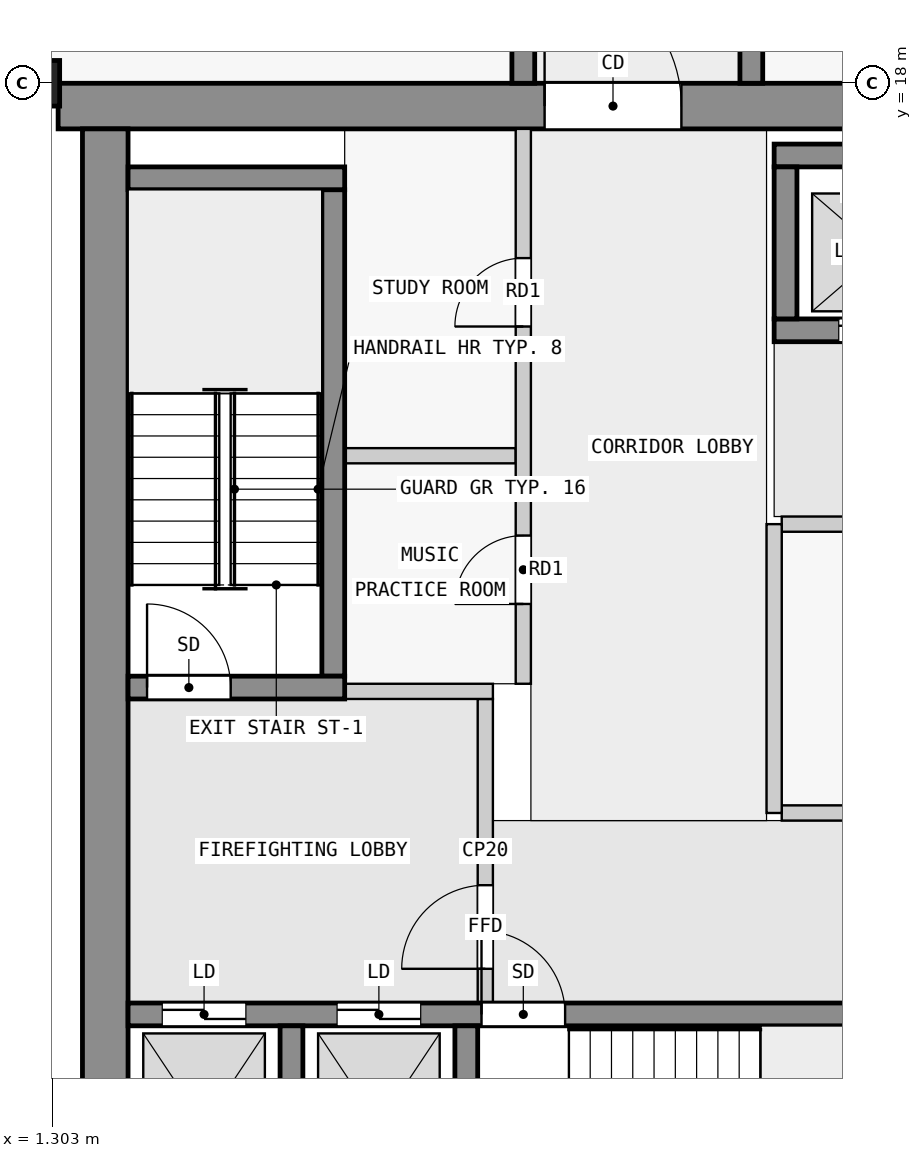
"""IFC4 building model, lengths in metres.
Left out: names, types, materials, properties, quantities, classifications, styles, units other than length and angle.
Written with IfcOpenShell. Run it as: python <this file> out.ifc"""

import sys

from ifc_helpers import new_model, si_unit, direction, frame, frame_2d, origin, origin_2d, place, context, subcontext, project, spatial, rectangle, extrude, element, fill, save


model = new_model("IFC4")
c1 = context("Model", 3, precision=1e-05, world=origin(), true_north=direction((0.0, 1.0)))
c2 = subcontext(c1, "Body", "Model", "MODEL_VIEW")
j1 = project(units=[si_unit("LENGTHUNIT", "METRE"), si_unit("PLANEANGLEUNIT", "RADIAN")], contexts=[c1])
p1 = place(None, origin())
s1 = spatial("IfcSite", under=j1, at=p1, CompositionType="ELEMENT")
p2 = place(p1, origin())
s2 = spatial("IfcBuilding", under=s1, at=p2, CompositionType="ELEMENT")
p3 = place(p2, frame((0.0, 0.0, 160.4)))
s3 = spatial("IfcBuildingStorey", under=s2, at=p3, CompositionType="ELEMENT", Elevation=160.4)
p4 = place(p3, frame((0.7, 18.0, 0.0), z_axis=(0.0, 0.0, 1.0), x_axis=(0.0, 1.0, 0.0)))
e1 = element("IfcColumn", 1, at=p4, inside=s3, PredefinedType="COLUMN", context=c2, shape_type="SweptSolid", body=[
    extrude(rectangle(XDim=0.6, YDim=1.4, at=origin_2d()), origin(), (0.0, 0.0, 1.0), 3.5),
])
p5 = place(p3, frame((1.38, 17.7, 0.0), z_axis=(0.0, 0.0, 1.0), x_axis=(1.0, 0.0, 0.0)))
e2 = element("IfcWall", 2, at=p5, inside=s3, PredefinedType="SHEAR", context=c2, shape_type="SweptSolid", body=[
    extrude(rectangle(XDim=21.12, YDim=0.6, at=frame_2d((10.56, 0.0))), origin(), (0.0, 0.0, 1.0), 3.25),
])
p6 = place(p5, frame((6.4, 0.0, 0.0)))
e3 = element("IfcOpeningElement", 3, at=p6, cuts=e2, PredefinedType="OPENING", context=c2, shape_type="SweptSolid", body=[
    extrude(rectangle(XDim=1.8, YDim=2.1, at=frame_2d((0.9, 1.05))), frame((0.0, 0.31, 0.0), z_axis=(0.0, -1.0, 0.0), x_axis=(1.0, 0.0, 0.0)), (0.0, 0.0, 1.0), 0.62),
])
p7 = place(p3, frame((2.0, 2.5, 0.0), z_axis=(0.0, 0.0, 1.0), x_axis=(0.0, 1.0, 0.0)))
e4 = element("IfcWall", 4, at=p7, inside=s3, PredefinedType="SHEAR", context=c2, shape_type="SweptSolid", body=[
    extrude(rectangle(XDim=14.9, YDim=0.6, at=frame_2d((7.45, 0.0))), origin(), (0.0, 0.0, 1.0), 3.25),
])
for number, where, z_axis, x_axis in (
    (5, (4.45, 2.8, 0.0), (0.0, 0.0, 1.0), (0.0, 1.0, 0.0)),
    (6, (6.75, 2.8, 0.0), (0.0, 0.0, 1.0), (0.0, 1.0, 0.0)),
):
    element("IfcWall", number, at=place(p3, frame(where, z_axis=z_axis, x_axis=x_axis)), inside=s3, PredefinedType="SHEAR", context=c2, shape_type="SweptSolid", body=[
        extrude(rectangle(XDim=2.8, YDim=0.3, at=frame_2d((1.4, 0.0))), origin(), (0.0, 0.0, 1.0), 3.25),
    ])
p8 = place(p3, frame((2.3, 5.75, 0.0), z_axis=(0.0, 0.0, 1.0), x_axis=(1.0, 0.0, 0.0)))
e7 = element("IfcWall", 7, at=p8, inside=s3, PredefinedType="SHEAR", context=c2, shape_type="SweptSolid", body=[
    extrude(rectangle(XDim=18.8, YDim=0.3, at=frame_2d((9.4, 0.0))), origin(), (0.0, 0.0, 1.0), 3.25),
])
p9 = place(p8, frame((4.65, 0.0, 0.0)))
e8 = element("IfcOpeningElement", 8, at=p9, cuts=e7, PredefinedType="OPENING", context=c2, shape_type="SweptSolid", body=[
    extrude(rectangle(XDim=1.1, YDim=2.1, at=frame_2d((0.55, 1.05))), frame((0.0, 0.16, 0.0), z_axis=(0.0, -1.0, 0.0), x_axis=(1.0, 0.0, 0.0)), (0.0, 0.0, 1.0), 0.32),
])
p10 = place(p8, frame((0.45, 0.0, 0.0)))
e9 = element("IfcOpeningElement", 9, at=p10, cuts=e7, PredefinedType="OPENING", context=c2, shape_type="SweptSolid", body=[
    extrude(rectangle(XDim=1.1, YDim=2.1, at=frame_2d((0.55, 1.05))), frame((0.0, 0.16, 0.0), z_axis=(0.0, -1.0, 0.0), x_axis=(1.0, 0.0, 0.0)), (0.0, 0.0, 1.0), 0.32),
])
p11 = place(p8, frame((2.75, 0.0, 0.0)))
e10 = element("IfcOpeningElement", 10, at=p11, cuts=e7, PredefinedType="OPENING", context=c2, shape_type="SweptSolid", body=[
    extrude(rectangle(XDim=1.1, YDim=2.1, at=frame_2d((0.55, 1.05))), frame((0.0, 0.16, 0.0), z_axis=(0.0, -1.0, 0.0), x_axis=(1.0, 0.0, 0.0)), (0.0, 0.0, 1.0), 0.32),
])
p12 = place(p8, frame((11.95, 0.0, 0.0)))
e11 = element("IfcOpeningElement", 11, at=p12, cuts=e7, PredefinedType="OPENING", context=c2, shape_type="SweptSolid", body=[
    extrude(rectangle(XDim=0.9, YDim=2.1, at=frame_2d((0.45, 1.05))), frame((0.0, 0.16, 0.0), z_axis=(0.0, -1.0, 0.0), x_axis=(1.0, 0.0, 0.0)), (0.0, 0.0, 1.0), 0.32),
])
p13 = place(p8, frame((15.7, 0.0, 0.0)))
e12 = element("IfcOpeningElement", 12, at=p13, cuts=e7, PredefinedType="OPENING", context=c2, shape_type="SweptSolid", body=[
    extrude(rectangle(XDim=0.9, YDim=2.1, at=frame_2d((0.45, 1.05))), frame((0.0, 0.16, 0.0), z_axis=(0.0, -1.0, 0.0), x_axis=(1.0, 0.0, 0.0)), (0.0, 0.0, 1.0), 0.32),
])
p14 = place(p3, frame((2.3, 10.05, 0.0), z_axis=(0.0, 0.0, 1.0), x_axis=(1.0, 0.0, 0.0)))
e13 = element("IfcWall", 13, at=p14, inside=s3, PredefinedType="SHEAR", context=c2, shape_type="SweptSolid", body=[
    extrude(rectangle(XDim=2.85, YDim=0.3, at=frame_2d((1.425, 0.0))), origin(), (0.0, 0.0, 1.0), 3.25),
])
p15 = place(p14, frame((0.25, 0.0, 0.0)))
e14 = element("IfcOpeningElement", 14, at=p15, cuts=e13, PredefinedType="OPENING", context=c2, shape_type="SweptSolid", body=[
    extrude(rectangle(XDim=1.1, YDim=2.1, at=frame_2d((0.55, 1.05))), frame((0.0, 0.16, 0.0), z_axis=(0.0, -1.0, 0.0), x_axis=(1.0, 0.0, 0.0)), (0.0, 0.0, 1.0), 0.32),
])
p16 = place(p3, frame((5.0, 10.2, 0.0), z_axis=(0.0, 0.0, 1.0), x_axis=(0.0, 1.0, 0.0)))
e15 = element("IfcWall", 15, at=p16, inside=s3, PredefinedType="SHEAR", context=c2, shape_type="SweptSolid", body=[
    extrude(rectangle(XDim=6.4, YDim=0.3, at=frame_2d((3.2, 0.0))), origin(), (0.0, 0.0, 1.0), 3.25),
])
p17 = place(p3, frame((2.3, 16.75, 0.0), z_axis=(0.0, 0.0, 1.0), x_axis=(1.0, 0.0, 0.0)))
e16 = element("IfcWall", 16, at=p17, inside=s3, PredefinedType="SHEAR", context=c2, shape_type="SweptSolid", body=[
    extrude(rectangle(XDim=2.85, YDim=0.3, at=frame_2d((1.425, 0.0))), origin(), (0.0, 0.0, 1.0), 3.25),
])
p18 = place(p3, frame((10.8, 17.05, 0.0), z_axis=(0.0, 0.0, 1.0), x_axis=(1.0, 0.0, 0.0)))
e17 = element("IfcWall", 17, at=p18, inside=s3, PredefinedType="SHEAR", context=c2, shape_type="SweptSolid", body=[
    extrude(rectangle(XDim=7.8, YDim=0.3, at=frame_2d((3.9, 0.0))), origin(), (0.0, 0.0, 1.0), 3.25),
])
p19 = place(p3, frame((10.8, 14.75, 0.0), z_axis=(0.0, 0.0, 1.0), x_axis=(1.0, 0.0, 0.0)))
e18 = element("IfcWall", 18, at=p19, inside=s3, PredefinedType="SHEAR", context=c2, shape_type="SweptSolid", body=[
    extrude(rectangle(XDim=7.8, YDim=0.3, at=frame_2d((3.9, 0.0))), origin(), (0.0, 0.0, 1.0), 3.25),
])
p20 = place(p19, frame((0.85, 0.0, 0.0)))
e19 = element("IfcOpeningElement", 19, at=p20, cuts=e18, PredefinedType="OPENING", context=c2, shape_type="SweptSolid", body=[
    extrude(rectangle(XDim=1.1, YDim=2.1, at=frame_2d((0.55, 1.05))), frame((0.0, 0.16, 0.0), z_axis=(0.0, -1.0, 0.0), x_axis=(1.0, 0.0, 0.0)), (0.0, 0.0, 1.0), 0.32),
])
p21 = place(p19, frame((3.35, 0.0, 0.0)))
e20 = element("IfcOpeningElement", 20, at=p21, cuts=e18, PredefinedType="OPENING", context=c2, shape_type="SweptSolid", body=[
    extrude(rectangle(XDim=1.1, YDim=2.1, at=frame_2d((0.55, 1.05))), frame((0.0, 0.16, 0.0), z_axis=(0.0, -1.0, 0.0), x_axis=(1.0, 0.0, 0.0)), (0.0, 0.0, 1.0), 0.32),
])
p22 = place(p19, frame((5.85, 0.0, 0.0)))
e21 = element("IfcOpeningElement", 21, at=p22, cuts=e18, PredefinedType="OPENING", context=c2, shape_type="SweptSolid", body=[
    extrude(rectangle(XDim=1.1, YDim=2.1, at=frame_2d((0.55, 1.05))), frame((0.0, 0.16, 0.0), z_axis=(0.0, -1.0, 0.0), x_axis=(1.0, 0.0, 0.0)), (0.0, 0.0, 1.0), 0.32),
])
p23 = place(p3, frame((10.95, 14.9, 0.0), z_axis=(0.0, 0.0, 1.0), x_axis=(0.0, 1.0, 0.0)))
e22 = element("IfcWall", 22, at=p23, inside=s3, PredefinedType="SHEAR", context=c2, shape_type="SweptSolid", body=[
    extrude(rectangle(XDim=2.0, YDim=0.3, at=frame_2d((1.0, 0.0))), origin(), (0.0, 0.0, 1.0), 3.25),
])
p24 = place(p3, frame((7.5, 18.0, 0.0), z_axis=(0.0, 0.0, 1.0), x_axis=(0.0, 1.0, 0.0)))
e23 = element("IfcWall", 23, at=p24, inside=s3, PredefinedType="SHEAR", context=c2, shape_type="SweptSolid", body=[
    extrude(rectangle(XDim=27.0, YDim=0.3, at=frame_2d((13.5, 0.0))), origin(), (0.0, 0.0, 1.0), 3.25),
])
p25 = place(p24, frame((1.75, 0.0, 0.0)))
e24 = element("IfcOpeningElement", 24, at=p25, cuts=e23, PredefinedType="OPENING", context=c2, shape_type="SweptSolid", body=[
    extrude(rectangle(XDim=1.0, YDim=2.1, at=frame_2d((0.5, 1.05))), frame((0.0, 0.16, 0.0), z_axis=(0.0, -1.0, 0.0), x_axis=(1.0, 0.0, 0.0)), (0.0, 0.0, 1.0), 0.32),
])
p26 = place(p24, frame((6.25, 0.0, 0.0)))
e25 = element("IfcOpeningElement", 25, at=p26, cuts=e23, PredefinedType="OPENING", context=c2, shape_type="SweptSolid", body=[
    extrude(rectangle(XDim=1.0, YDim=2.1, at=frame_2d((0.5, 1.05))), frame((0.0, 0.16, 0.0), z_axis=(0.0, -1.0, 0.0), x_axis=(1.0, 0.0, 0.0)), (0.0, 0.0, 1.0), 0.32),
])
p27 = place(p24, frame((10.75, 0.0, 0.0)))
e26 = element("IfcOpeningElement", 26, at=p27, cuts=e23, PredefinedType="OPENING", context=c2, shape_type="SweptSolid", body=[
    extrude(rectangle(XDim=1.0, YDim=2.1, at=frame_2d((0.5, 1.05))), frame((0.0, 0.16, 0.0), z_axis=(0.0, -1.0, 0.0), x_axis=(1.0, 0.0, 0.0)), (0.0, 0.0, 1.0), 0.32),
])
p28 = place(p24, frame((15.25, 0.0, 0.0)))
e27 = element("IfcOpeningElement", 27, at=p28, cuts=e23, PredefinedType="OPENING", context=c2, shape_type="SweptSolid", body=[
    extrude(rectangle(XDim=1.0, YDim=2.1, at=frame_2d((0.5, 1.05))), frame((0.0, 0.16, 0.0), z_axis=(0.0, -1.0, 0.0), x_axis=(1.0, 0.0, 0.0)), (0.0, 0.0, 1.0), 0.32),
])
p29 = place(p24, frame((21.35, 0.0, 0.0)))
e28 = element("IfcOpeningElement", 28, at=p29, cuts=e23, PredefinedType="OPENING", context=c2, shape_type="SweptSolid", body=[
    extrude(rectangle(XDim=1.0, YDim=2.1, at=frame_2d((0.5, 1.05))), frame((0.0, 0.16, 0.0), z_axis=(0.0, -1.0, 0.0), x_axis=(1.0, 0.0, 0.0)), (0.0, 0.0, 1.0), 0.32),
])
p30 = place(p3, frame((10.5, 18.0, 0.0), z_axis=(0.0, 0.0, 1.0), x_axis=(0.0, 1.0, 0.0)))
e29 = element("IfcWall", 29, at=p30, inside=s3, PredefinedType="SHEAR", context=c2, shape_type="SweptSolid", body=[
    extrude(rectangle(XDim=27.0, YDim=0.3, at=frame_2d((13.5, 0.0))), origin(), (0.0, 0.0, 1.0), 3.25),
])
p31 = place(p30, frame((1.75, 0.0, 0.0)))
e30 = element("IfcOpeningElement", 30, at=p31, cuts=e29, PredefinedType="OPENING", context=c2, shape_type="SweptSolid", body=[
    extrude(rectangle(XDim=1.0, YDim=2.1, at=frame_2d((0.5, 1.05))), frame((0.0, 0.16, 0.0), z_axis=(0.0, -1.0, 0.0), x_axis=(1.0, 0.0, 0.0)), (0.0, 0.0, 1.0), 0.32),
])
p32 = place(p30, frame((6.25, 0.0, 0.0)))
e31 = element("IfcOpeningElement", 31, at=p32, cuts=e29, PredefinedType="OPENING", context=c2, shape_type="SweptSolid", body=[
    extrude(rectangle(XDim=1.0, YDim=2.1, at=frame_2d((0.5, 1.05))), frame((0.0, 0.16, 0.0), z_axis=(0.0, -1.0, 0.0), x_axis=(1.0, 0.0, 0.0)), (0.0, 0.0, 1.0), 0.32),
])
p33 = place(p30, frame((10.35, 0.0, 0.0)))
e32 = element("IfcOpeningElement", 32, at=p33, cuts=e29, PredefinedType="OPENING", context=c2, shape_type="SweptSolid", body=[
    extrude(rectangle(XDim=1.8, YDim=2.1, at=frame_2d((0.9, 1.05))), frame((0.0, 0.16, 0.0), z_axis=(0.0, -1.0, 0.0), x_axis=(1.0, 0.0, 0.0)), (0.0, 0.0, 1.0), 0.32),
])
p34 = place(p30, frame((17.55, 0.0, 0.0)))
e33 = element("IfcOpeningElement", 33, at=p34, cuts=e29, PredefinedType="OPENING", context=c2, shape_type="SweptSolid", body=[
    extrude(rectangle(XDim=1.0, YDim=2.1, at=frame_2d((0.5, 1.05))), frame((0.0, 0.16, 0.0), z_axis=(0.0, -1.0, 0.0), x_axis=(1.0, 0.0, 0.0)), (0.0, 0.0, 1.0), 0.32),
])
p35 = place(p30, frame((23.25, 0.0, 0.0)))
e34 = element("IfcOpeningElement", 34, at=p35, cuts=e29, PredefinedType="OPENING", context=c2, shape_type="SweptSolid", body=[
    extrude(rectangle(XDim=0.9, YDim=2.1, at=frame_2d((0.45, 1.05))), frame((0.0, 0.16, 0.0), z_axis=(0.0, -1.0, 0.0), x_axis=(1.0, 0.0, 0.0)), (0.0, 0.0, 1.0), 0.32),
])
p36 = place(p30, frame((25.45, 0.0, 0.0)))
e35 = element("IfcOpeningElement", 35, at=p36, cuts=e29, PredefinedType="OPENING", context=c2, shape_type="SweptSolid", body=[
    extrude(rectangle(XDim=1.0, YDim=2.1, at=frame_2d((0.5, 1.05))), frame((0.0, 0.16, 0.0), z_axis=(0.0, -1.0, 0.0), x_axis=(1.0, 0.0, 0.0)), (0.0, 0.0, 1.0), 0.32),
])
p37 = place(p3, frame((7.0, 5.9, 0.0), z_axis=(0.0, 0.0, 1.0), x_axis=(0.0, 1.0, 0.0)))
e36 = element("IfcWall", 36, at=p37, inside=s3, PredefinedType="PARTITIONING", context=c2, shape_type="SweptSolid", body=[
    extrude(rectangle(XDim=4.0, YDim=0.2, at=frame_2d((2.0, 0.0))), origin(), (0.0, 0.0, 1.0), 3.25),
])
p38 = place(p37, frame((0.45, 0.0, 0.0)))
e37 = element("IfcOpeningElement", 37, at=p38, cuts=e36, PredefinedType="OPENING", context=c2, shape_type="SweptSolid", body=[
    extrude(rectangle(XDim=1.1, YDim=2.1, at=frame_2d((0.55, 1.05))), frame((0.0, 0.11, 0.0), z_axis=(0.0, -1.0, 0.0), x_axis=(1.0, 0.0, 0.0)), (0.0, 0.0, 1.0), 0.22),
])
p39 = place(p3, frame((5.15, 10.0, 0.0), z_axis=(0.0, 0.0, 1.0), x_axis=(1.0, 0.0, 0.0)))
e38 = element("IfcWall", 38, at=p39, inside=s3, PredefinedType="PARTITIONING", context=c2, shape_type="SweptSolid", body=[
    extrude(rectangle(XDim=1.95, YDim=0.2, at=frame_2d((0.975, 0.0))), origin(), (0.0, 0.0, 1.0), 3.25),
])
p40 = place(p3, frame((10.8, 8.4, 0.0), z_axis=(0.0, 0.0, 1.0), x_axis=(0.0, 1.0, 0.0)))
e39 = element("IfcWall", 39, at=p40, inside=s3, PredefinedType="PARTITIONING", context=c2, shape_type="SweptSolid", body=[
    extrude(rectangle(XDim=3.8, YDim=0.2, at=frame_2d((1.9, 0.0))), origin(), (0.0, 0.0, 1.0), 3.25),
])
p41 = place(p3, frame((10.9, 8.4, 0.0), z_axis=(0.0, 0.0, 1.0), x_axis=(1.0, 0.0, 0.0)))
e40 = element("IfcWall", 40, at=p41, inside=s3, PredefinedType="PARTITIONING", context=c2, shape_type="SweptSolid", body=[
    extrude(rectangle(XDim=8.5, YDim=0.2, at=frame_2d((4.25, 0.0))), origin(), (0.0, 0.0, 1.0), 3.25),
])
p42 = place(p3, frame((10.9, 12.2, 0.0), z_axis=(0.0, 0.0, 1.0), x_axis=(1.0, 0.0, 0.0)))
e41 = element("IfcWall", 41, at=p42, inside=s3, PredefinedType="PARTITIONING", context=c2, shape_type="SweptSolid", body=[
    extrude(rectangle(XDim=8.5, YDim=0.2, at=frame_2d((4.25, 0.0))), origin(), (0.0, 0.0, 1.0), 3.25),
])
p43 = place(p42, frame((1.4, 0.0, 0.0)))
e42 = element("IfcOpeningElement", 42, at=p43, cuts=e41, PredefinedType="OPENING", context=c2, shape_type="SweptSolid", body=[
    extrude(rectangle(XDim=0.9, YDim=2.1, at=frame_2d((0.45, 1.05))), frame((0.0, 0.11, 0.0), z_axis=(0.0, -1.0, 0.0), x_axis=(1.0, 0.0, 0.0)), (0.0, 0.0, 1.0), 0.22),
])
p44 = place(p42, frame((5.75, 0.0, 0.0)))
e43 = element("IfcOpeningElement", 43, at=p44, cuts=e41, PredefinedType="OPENING", context=c2, shape_type="SweptSolid", body=[
    extrude(rectangle(XDim=0.9, YDim=2.1, at=frame_2d((0.45, 1.05))), frame((0.0, 0.11, 0.0), z_axis=(0.0, -1.0, 0.0), x_axis=(1.0, 0.0, 0.0)), (0.0, 0.0, 1.0), 0.22),
])
p45 = place(p3, frame((7.5, 10.1, 0.0), z_axis=(0.0, 0.0, 1.0), x_axis=(0.0, 1.0, 0.0)))
e44 = element("IfcWall", 44, at=p45, inside=s3, PredefinedType="PARTITIONING", context=c2, shape_type="SweptSolid", body=[
    extrude(rectangle(XDim=7.3, YDim=0.2, at=frame_2d((3.65, 0.0))), origin(), (0.0, 0.0, 1.0), 3.25),
])
p46 = place(p45, frame((1.05, 0.0, 0.0)))
e45 = element("IfcOpeningElement", 45, at=p46, cuts=e44, PredefinedType="OPENING", context=c2, shape_type="SweptSolid", body=[
    extrude(rectangle(XDim=0.9, YDim=2.1, at=frame_2d((0.45, 1.05))), frame((0.0, 0.11, 0.0), z_axis=(0.0, -1.0, 0.0), x_axis=(1.0, 0.0, 0.0)), (0.0, 0.0, 1.0), 0.22),
])
p47 = place(p45, frame((4.7, 0.0, 0.0)))
e46 = element("IfcOpeningElement", 46, at=p47, cuts=e44, PredefinedType="OPENING", context=c2, shape_type="SweptSolid", body=[
    extrude(rectangle(XDim=0.9, YDim=2.1, at=frame_2d((0.45, 1.05))), frame((0.0, 0.11, 0.0), z_axis=(0.0, -1.0, 0.0), x_axis=(1.0, 0.0, 0.0)), (0.0, 0.0, 1.0), 0.22),
])
p48 = place(p3, frame((5.15, 13.1, 0.0), z_axis=(0.0, 0.0, 1.0), x_axis=(1.0, 0.0, 0.0)))
e47 = element("IfcWall", 47, at=p48, inside=s3, PredefinedType="PARTITIONING", context=c2, shape_type="SweptSolid", body=[
    extrude(rectangle(XDim=2.25, YDim=0.2, at=frame_2d((1.125, 0.0))), origin(), (0.0, 0.0, 1.0), 3.25),
])
p49 = place(p38, origin())
e48 = element("IfcDoor", 48, at=p49, inside=s3, OperationType="SINGLE_SWING_LEFT", PredefinedType="DOOR", context=c2, shape_type="SweptSolid", body=[
    extrude(rectangle(XDim=1.1, YDim=2.1, at=frame_2d((0.55, 1.05))), frame((0.0, 0.025, 0.0), z_axis=(0.0, -1.0, 0.0), x_axis=(1.0, 0.0, 0.0)), (0.0, 0.0, 1.0), 0.05),
])
fill(e37, e48)
p50 = place(p15, origin())
e49 = element("IfcDoor", 49, at=p50, inside=s3, OperationType="SINGLE_SWING_RIGHT", PredefinedType="DOOR", context=c2, shape_type="SweptSolid", body=[
    extrude(rectangle(XDim=1.1, YDim=2.1, at=frame_2d((0.55, 1.05))), frame((0.0, 0.025, 0.0), z_axis=(0.0, -1.0, 0.0), x_axis=(1.0, 0.0, 0.0)), (0.0, 0.0, 1.0), 0.05),
])
fill(e14, e49)
p51 = place(p9, origin())
e50 = element("IfcDoor", 50, at=p51, inside=s3, OperationType="SINGLE_SWING_LEFT", PredefinedType="DOOR", context=c2, shape_type="SweptSolid", body=[
    extrude(rectangle(XDim=1.1, YDim=2.1, at=frame_2d((0.55, 1.05))), frame((0.0, 0.025, 0.0), z_axis=(0.0, -1.0, 0.0), x_axis=(1.0, 0.0, 0.0)), (0.0, 0.0, 1.0), 0.05),
])
fill(e8, e50)
p52 = place(p10, origin())
e51 = element("IfcDoor", 51, at=p52, inside=s3, OperationType="DOUBLE_DOOR_SLIDING", PredefinedType="DOOR", context=c2, shape_type="SweptSolid", body=[
    extrude(rectangle(XDim=1.1, YDim=2.1, at=frame_2d((0.55, 1.05))), frame((0.0, 0.025, 0.0), z_axis=(0.0, -1.0, 0.0), x_axis=(1.0, 0.0, 0.0)), (0.0, 0.0, 1.0), 0.05),
])
fill(e9, e51)
p53 = place(p11, origin())
e52 = element("IfcDoor", 52, at=p53, inside=s3, OperationType="DOUBLE_DOOR_SLIDING", PredefinedType="DOOR", context=c2, shape_type="SweptSolid", body=[
    extrude(rectangle(XDim=1.1, YDim=2.1, at=frame_2d((0.55, 1.05))), frame((0.0, 0.025, 0.0), z_axis=(0.0, -1.0, 0.0), x_axis=(1.0, 0.0, 0.0)), (0.0, 0.0, 1.0), 0.05),
])
fill(e10, e52)
p54 = place(p20, origin())
e53 = element("IfcDoor", 53, at=p54, inside=s3, OperationType="DOUBLE_DOOR_SLIDING", PredefinedType="DOOR", context=c2, shape_type="SweptSolid", body=[
    extrude(rectangle(XDim=1.1, YDim=2.1, at=frame_2d((0.55, 1.05))), frame((0.0, 0.025, 0.0), z_axis=(0.0, -1.0, 0.0), x_axis=(1.0, 0.0, 0.0)), (0.0, 0.0, 1.0), 0.05),
])
fill(e19, e53)
p55 = place(p6, origin())
e54 = element("IfcDoor", 54, at=p55, inside=s3, OperationType="DOUBLE_DOOR_SINGLE_SWING", PredefinedType="DOOR", context=c2, shape_type="SweptSolid", body=[
    extrude(rectangle(XDim=1.8, YDim=2.1, at=frame_2d((0.9, 1.05))), frame((0.0, 0.025, 0.0), z_axis=(0.0, -1.0, 0.0), x_axis=(1.0, 0.0, 0.0)), (0.0, 0.0, 1.0), 0.05),
])
fill(e3, e54)
p56 = place(p46, origin())
e55 = element("IfcDoor", 55, at=p56, inside=s3, OperationType="SINGLE_SWING_RIGHT", PredefinedType="DOOR", context=c2, shape_type="SweptSolid", body=[
    extrude(rectangle(XDim=0.9, YDim=2.1, at=frame_2d((0.45, 1.05))), frame((0.0, 0.025, 0.0), z_axis=(0.0, -1.0, 0.0), x_axis=(1.0, 0.0, 0.0)), (0.0, 0.0, 1.0), 0.05),
])
fill(e45, e55)
p57 = place(p47, origin())
e56 = element("IfcDoor", 56, at=p57, inside=s3, OperationType="SINGLE_SWING_RIGHT", PredefinedType="DOOR", context=c2, shape_type="SweptSolid", body=[
    extrude(rectangle(XDim=0.9, YDim=2.1, at=frame_2d((0.45, 1.05))), frame((0.0, 0.025, 0.0), z_axis=(0.0, -1.0, 0.0), x_axis=(1.0, 0.0, 0.0)), (0.0, 0.0, 1.0), 0.05),
])
fill(e46, e56)
save(model, sys.argv[1])
